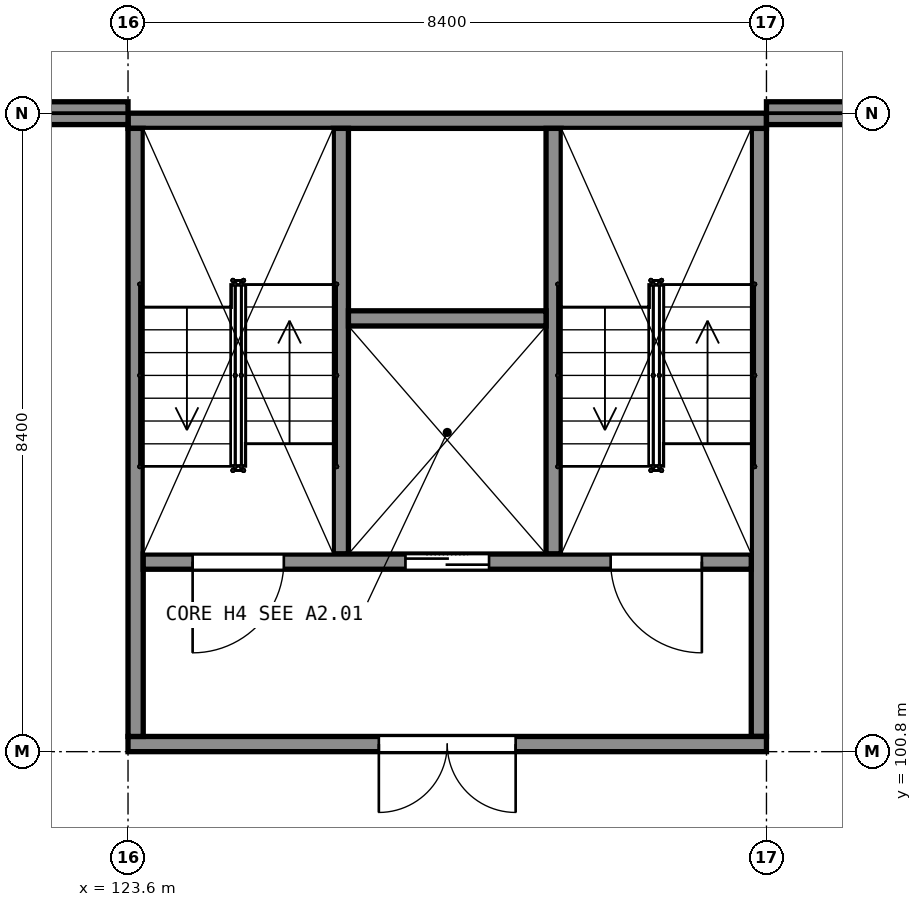
"""IFC4 building model, lengths in metres.
Left out: names, types, materials, properties, quantities, classifications, styles, units other than length and angle.
Written with IfcOpenShell. Run it as: python <this file> out.ifc"""

import sys

from ifc_helpers import new_model, si_unit, direction, frame, frame_2d, origin, place, context, subcontext, project, spatial, rectangle, extrude, element, fill, save


model = new_model("IFC4")
c1 = context("Model", 3, precision=1e-05, world=origin(), true_north=direction((0.0, 1.0)))
c2 = subcontext(c1, "Body", "Model", "MODEL_VIEW")
j1 = project(units=[si_unit("LENGTHUNIT", "METRE"), si_unit("PLANEANGLEUNIT", "RADIAN")], contexts=[c1])
p1 = place(None, origin())
s1 = spatial("IfcSite", under=j1, at=p1, CompositionType="ELEMENT")
p2 = place(p1, origin())
s2 = spatial("IfcBuilding", under=s1, at=p2, CompositionType="ELEMENT")
p3 = place(p2, frame((0.0, 0.0, 10.5)))
s3 = spatial("IfcBuildingStorey", under=s2, at=p3, CompositionType="ELEMENT", Elevation=10.5)
p4 = place(p3, frame((123.6, 100.9, 0.0), z_axis=(0.0, 0.0, 1.0), x_axis=(1.0, 0.0, 0.0)))
e1 = element("IfcWall", 1, at=p4, inside=s3, PredefinedType="SHEAR", context=c2, shape_type="SweptSolid", body=[
    extrude(rectangle(XDim=8.4, YDim=0.2, at=frame_2d((4.2, 0.0))), origin(), (0.0, 0.0, 1.0), 9.5),
])
p5 = place(p4, frame((3.3, 0.0, 0.0)))
e2 = element("IfcOpeningElement", 2, at=p5, cuts=e1, PredefinedType="OPENING", context=c2, shape_type="SweptSolid", body=[
    extrude(rectangle(XDim=1.8, YDim=2.1, at=frame_2d((0.9, 1.05))), frame((0.0, 0.11, 0.0), z_axis=(0.0, -1.0, 0.0), x_axis=(1.0, 0.0, 0.0)), (0.0, 0.0, 1.0), 0.22),
])
p6 = place(p3, frame((123.6, 109.1, 0.0), z_axis=(0.0, 0.0, 1.0), x_axis=(1.0, 0.0, 0.0)))
e3 = element("IfcWall", 3, at=p6, inside=s3, PredefinedType="SHEAR", context=c2, shape_type="SweptSolid", body=[
    extrude(rectangle(XDim=8.4, YDim=0.2, at=frame_2d((4.2, 0.0))), origin(), (0.0, 0.0, 1.0), 9.5),
])
for number, where, z_axis, x_axis in (
    (4, (123.7, 101.0, 0.0), (0.0, 0.0, 1.0), (0.0, 1.0, 0.0)),
    (5, (131.9, 101.0, 0.0), (0.0, 0.0, 1.0), (0.0, 1.0, 0.0)),
):
    element("IfcWall", number, at=place(p3, frame(where, z_axis=z_axis, x_axis=x_axis)), inside=s3, PredefinedType="SHEAR", context=c2, shape_type="SweptSolid", body=[
        extrude(rectangle(XDim=8.0, YDim=0.2, at=frame_2d((4.0, 0.0))), origin(), (0.0, 0.0, 1.0), 9.5),
    ])
p7 = place(p3, frame((123.8, 103.3, 0.0), z_axis=(0.0, 0.0, 1.0), x_axis=(1.0, 0.0, 0.0)))
e6 = element("IfcWall", 6, at=p7, inside=s3, PredefinedType="SHEAR", context=c2, shape_type="SweptSolid", body=[
    extrude(rectangle(XDim=8.0, YDim=0.2, at=frame_2d((4.0, 0.0))), origin(), (0.0, 0.0, 1.0), 9.5),
])
p8 = place(p7, frame((0.65, 0.0, 0.0)))
e7 = element("IfcOpeningElement", 7, at=p8, cuts=e6, PredefinedType="OPENING", context=c2, shape_type="SweptSolid", body=[
    extrude(rectangle(XDim=1.2, YDim=2.1, at=frame_2d((0.6, 1.05))), frame((0.0, 0.11, 0.0), z_axis=(0.0, -1.0, 0.0), x_axis=(1.0, 0.0, 0.0)), (0.0, 0.0, 1.0), 0.22),
])
p9 = place(p7, frame((6.15, 0.0, 0.0)))
e8 = element("IfcOpeningElement", 8, at=p9, cuts=e6, PredefinedType="OPENING", context=c2, shape_type="SweptSolid", body=[
    extrude(rectangle(XDim=1.2, YDim=2.1, at=frame_2d((0.6, 1.05))), frame((0.0, 0.11, 0.0), z_axis=(0.0, -1.0, 0.0), x_axis=(1.0, 0.0, 0.0)), (0.0, 0.0, 1.0), 0.22),
])
p10 = place(p7, frame((3.45, 0.0, 0.0)))
e9 = element("IfcOpeningElement", 9, at=p10, cuts=e6, PredefinedType="OPENING", context=c2, shape_type="SweptSolid", body=[
    extrude(rectangle(XDim=1.1, YDim=2.1, at=frame_2d((0.55, 1.05))), frame((0.0, 0.11, 0.0), z_axis=(0.0, -1.0, 0.0), x_axis=(1.0, 0.0, 0.0)), (0.0, 0.0, 1.0), 0.22),
])
for number, where, z_axis, x_axis in (
    (10, (126.4, 103.4, 0.0), (0.0, 0.0, 1.0), (0.0, 1.0, 0.0)),
    (11, (129.2, 103.4, 0.0), (0.0, 0.0, 1.0), (0.0, 1.0, 0.0)),
):
    element("IfcWall", number, at=place(p3, frame(where, z_axis=z_axis, x_axis=x_axis)), inside=s3, PredefinedType="SHEAR", context=c2, shape_type="SweptSolid", body=[
        extrude(rectangle(XDim=5.6, YDim=0.2, at=frame_2d((2.8, 0.0))), origin(), (0.0, 0.0, 1.0), 9.5),
    ])
p11 = place(p3, frame((126.5, 106.5, 0.0), z_axis=(0.0, 0.0, 1.0), x_axis=(1.0, 0.0, 0.0)))
e12 = element("IfcWall", 12, at=p11, inside=s3, PredefinedType="SHEAR", context=c2, shape_type="SweptSolid", body=[
    extrude(rectangle(XDim=2.6, YDim=0.2, at=frame_2d((1.3, 0.0))), origin(), (0.0, 0.0, 1.0), 9.5),
])
p12 = place(p3, frame((132.0, 109.2, 0.0), z_axis=(0.0, 0.0, 1.0), x_axis=(1.0, 0.0, 0.0)))
e13 = element("IfcWall", 13, at=p12, inside=s3, PredefinedType="SOLIDWALL", context=c2, shape_type="SweptSolid", body=[
    extrude(rectangle(XDim=8.4, YDim=0.3, at=frame_2d((4.2, 0.0))), origin(), (0.0, 0.0, 1.0), 8.44),
])
p13 = place(p12, frame((2.5, 0.0, 1.5)))
e14 = element("IfcOpeningElement", 14, at=p13, cuts=e13, PredefinedType="OPENING", context=c2, shape_type="SweptSolid", body=[
    extrude(rectangle(XDim=0.6, YDim=6.0, at=frame_2d((0.3, 3.0))), frame((0.0, 0.16, 0.0), z_axis=(0.0, -1.0, 0.0), x_axis=(1.0, 0.0, 0.0)), (0.0, 0.0, 1.0), 0.32),
])
p14 = place(p12, frame((5.3, 0.0, 1.5)))
e15 = element("IfcOpeningElement", 15, at=p14, cuts=e13, PredefinedType="OPENING", context=c2, shape_type="SweptSolid", body=[
    extrude(rectangle(XDim=0.6, YDim=6.0, at=frame_2d((0.3, 3.0))), frame((0.0, 0.16, 0.0), z_axis=(0.0, -1.0, 0.0), x_axis=(1.0, 0.0, 0.0)), (0.0, 0.0, 1.0), 0.32),
])
p15 = place(p3, frame((115.55, 109.2, 0.0), z_axis=(0.0, 0.0, 1.0), x_axis=(1.0, 0.0, 0.0)))
e16 = element("IfcWall", 16, at=p15, inside=s3, PredefinedType="SOLIDWALL", context=c2, shape_type="SweptSolid", body=[
    extrude(rectangle(XDim=8.05, YDim=0.3, at=frame_2d((4.025, 0.0))), origin(), (0.0, 0.0, 1.0), 8.44),
])
p16 = place(p15, frame((2.325, 0.0, 1.5)))
e17 = element("IfcOpeningElement", 17, at=p16, cuts=e16, PredefinedType="OPENING", context=c2, shape_type="SweptSolid", body=[
    extrude(rectangle(XDim=0.6, YDim=6.0, at=frame_2d((0.3, 3.0))), frame((0.0, 0.16, 0.0), z_axis=(0.0, -1.0, 0.0), x_axis=(1.0, 0.0, 0.0)), (0.0, 0.0, 1.0), 0.32),
])
p17 = place(p15, frame((5.125, 0.0, 1.5)))
e18 = element("IfcOpeningElement", 18, at=p17, cuts=e16, PredefinedType="OPENING", context=c2, shape_type="SweptSolid", body=[
    extrude(rectangle(XDim=0.6, YDim=6.0, at=frame_2d((0.3, 3.0))), frame((0.0, 0.16, 0.0), z_axis=(0.0, -1.0, 0.0), x_axis=(1.0, 0.0, 0.0)), (0.0, 0.0, 1.0), 0.32),
])
p18 = place(p5, origin())
e19 = element("IfcDoor", 19, at=p18, inside=s3, OperationType="DOUBLE_DOOR_SINGLE_SWING", PredefinedType="DOOR", context=c2, shape_type="SweptSolid", body=[
    extrude(rectangle(XDim=1.8, YDim=2.1, at=frame_2d((0.9, 1.05))), frame((0.0, 0.025, 0.0), z_axis=(0.0, -1.0, 0.0), x_axis=(1.0, 0.0, 0.0)), (0.0, 0.0, 1.0), 0.05),
])
fill(e2, e19)
p19 = place(p8, origin())
e20 = element("IfcDoor", 20, at=p19, inside=s3, OperationType="SINGLE_SWING_LEFT", PredefinedType="DOOR", context=c2, shape_type="SweptSolid", body=[
    extrude(rectangle(XDim=1.2, YDim=2.1, at=frame_2d((0.6, 1.05))), frame((0.0, 0.025, 0.0), z_axis=(0.0, -1.0, 0.0), x_axis=(1.0, 0.0, 0.0)), (0.0, 0.0, 1.0), 0.05),
])
fill(e7, e20)
p20 = place(p9, origin())
e21 = element("IfcDoor", 21, at=p20, inside=s3, OperationType="SINGLE_SWING_RIGHT", PredefinedType="DOOR", context=c2, shape_type="SweptSolid", body=[
    extrude(rectangle(XDim=1.2, YDim=2.1, at=frame_2d((0.6, 1.05))), frame((0.0, 0.025, 0.0), z_axis=(0.0, -1.0, 0.0), x_axis=(1.0, 0.0, 0.0)), (0.0, 0.0, 1.0), 0.05),
])
fill(e8, e21)
p21 = place(p10, origin())
e22 = element("IfcDoor", 22, at=p21, inside=s3, OperationType="DOUBLE_DOOR_SLIDING", PredefinedType="DOOR", context=c2, shape_type="SweptSolid", body=[
    extrude(rectangle(XDim=1.1, YDim=2.1, at=frame_2d((0.55, 1.05))), frame((0.0, 0.025, 0.0), z_axis=(0.0, -1.0, 0.0), x_axis=(1.0, 0.0, 0.0)), (0.0, 0.0, 1.0), 0.05),
])
fill(e9, e22)
save(model, sys.argv[1])
